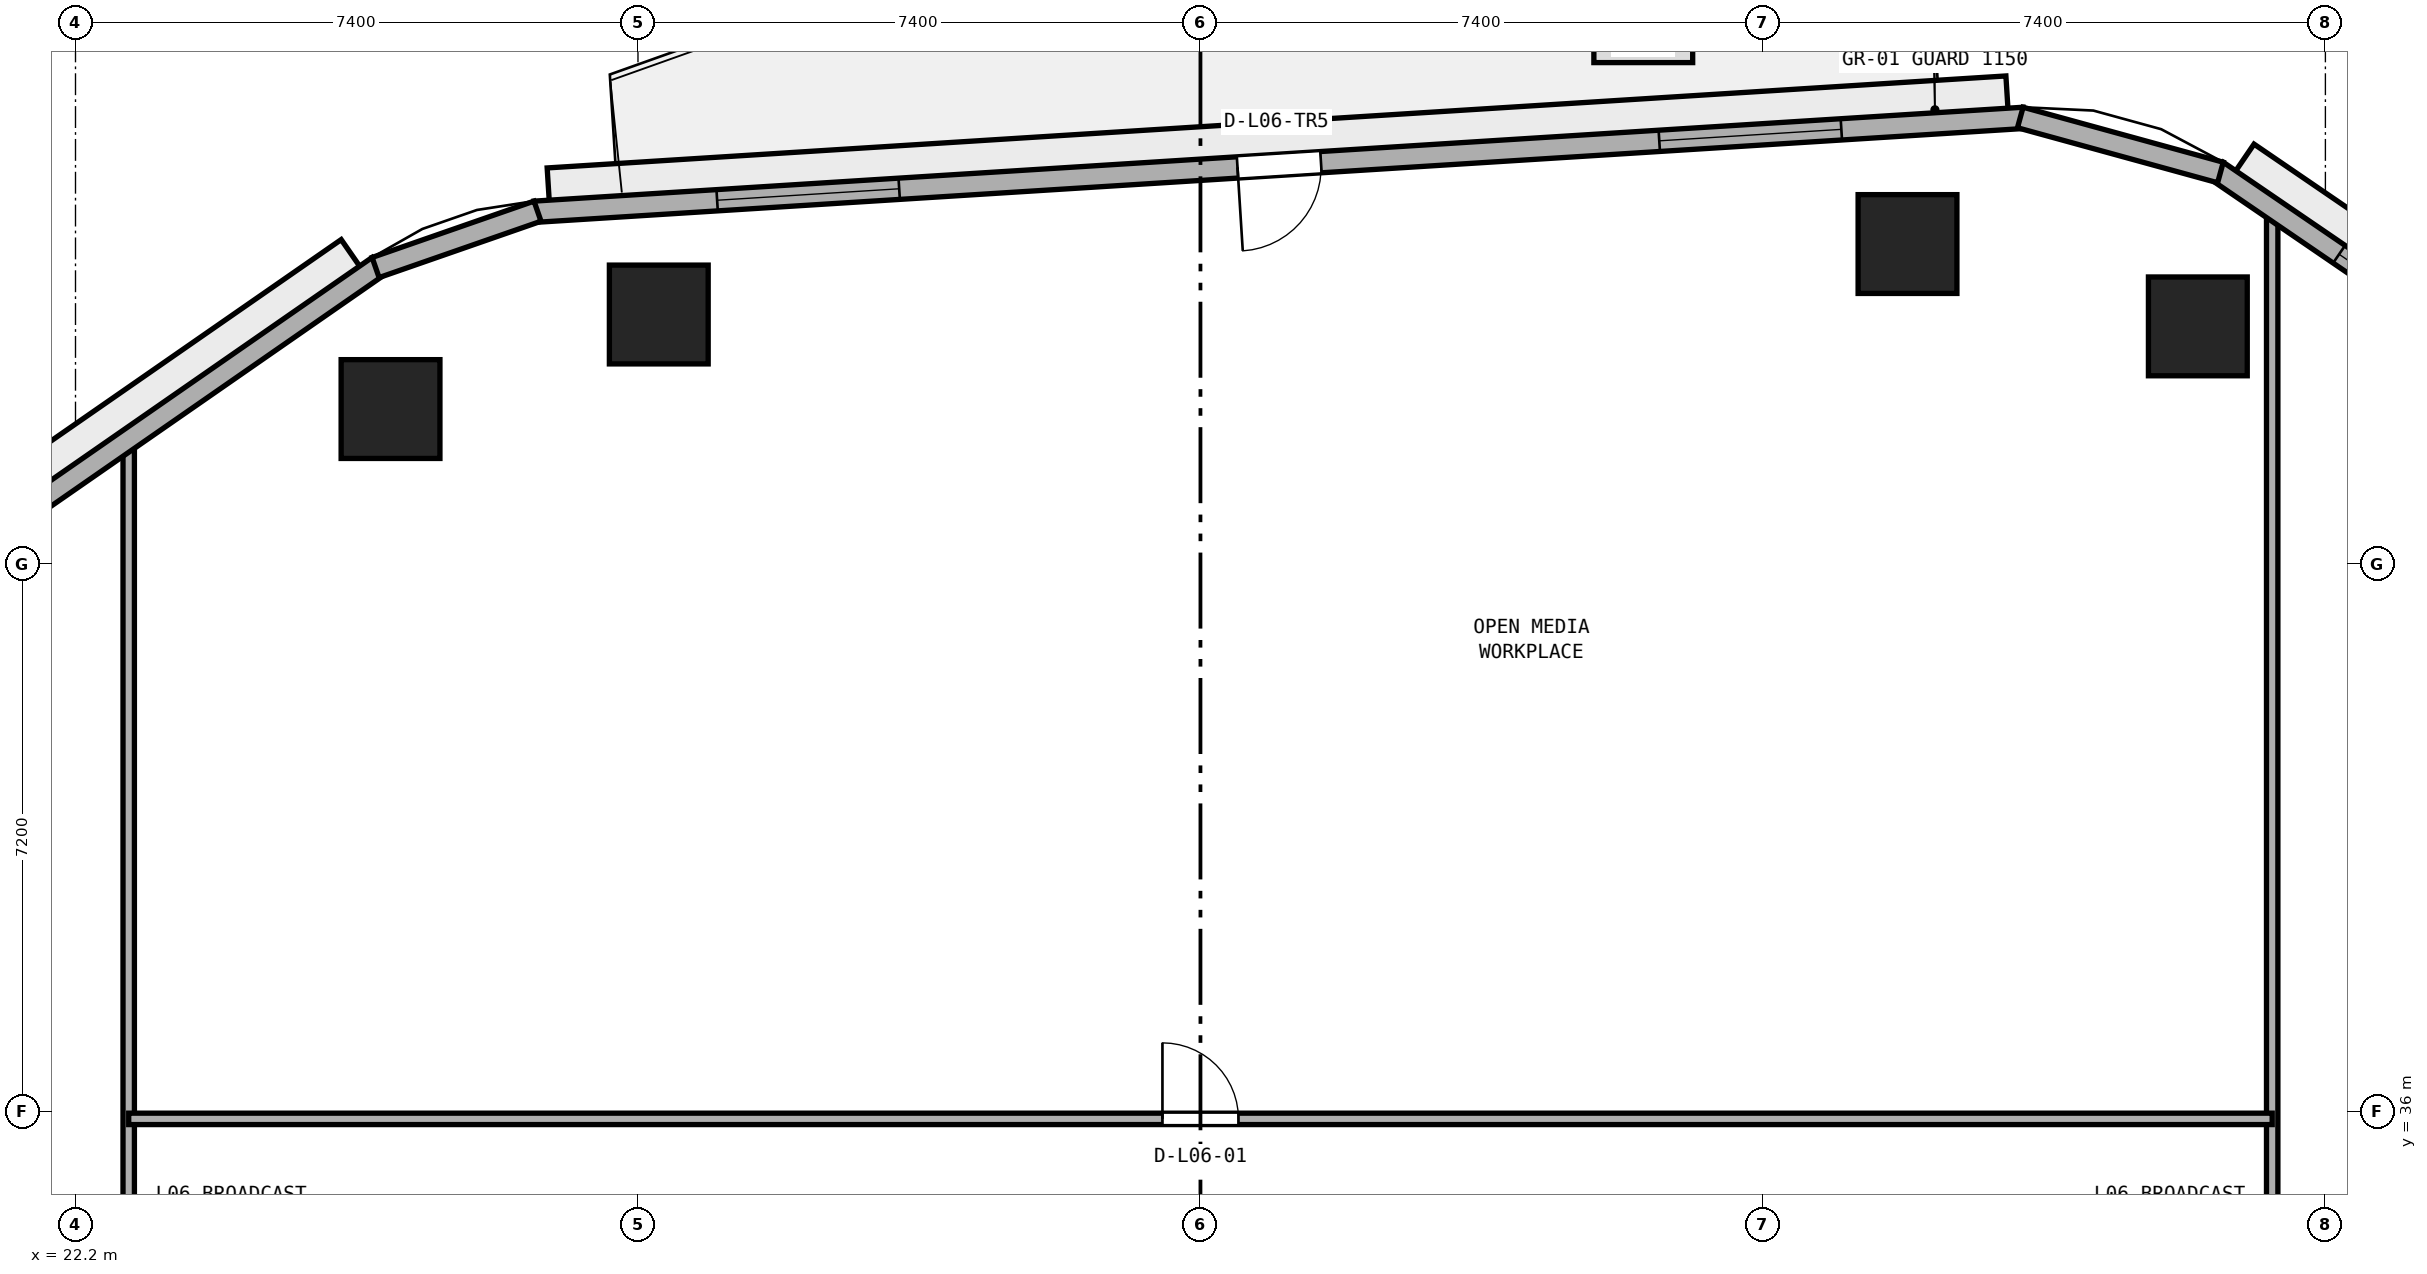
"""IFC4 building model, lengths in metres.
Left out: names, types, materials, properties, quantities, classifications, styles, units other than length and angle.
Written with IfcOpenShell. Run it as: python <this file> out.ifc"""

import sys

from ifc_helpers import new_model, si_unit, direction, frame, frame_2d, origin, origin_2d, place, context, subcontext, project, spatial, rectangle, extrude, element, fill, save


model = new_model("IFC4")
c1 = context("Model", 3, precision=1e-05, world=origin(), true_north=direction((0.0, 1.0)))
c2 = subcontext(c1, "Body", "Model", "MODEL_VIEW")
j1 = project(units=[si_unit("LENGTHUNIT", "METRE"), si_unit("PLANEANGLEUNIT", "RADIAN")], contexts=[c1])
p1 = place(None, origin())
s1 = spatial("IfcSite", under=j1, at=p1, CompositionType="ELEMENT")
p2 = place(p1, origin())
s2 = spatial("IfcBuilding", under=s1, at=p2, CompositionType="ELEMENT")
p3 = place(p2, frame((0.0, 0.0, 28.8)))
s3 = spatial("IfcBuildingStorey", under=s2, at=p3, CompositionType="ELEMENT", Elevation=28.8)
for number, where, z_axis, x_axis in (
    (1, (50.122, 46.326, 0.0), (0.0, 0.0, 1.0), (1.0, 0.0, 0.0)),
    (2, (46.302, 47.409, 0.0), (0.0, 0.0, 1.0), (1.0, 0.0, 0.0)),
    (3, (29.874, 46.482, 0.0), (0.0, 0.0, 1.0), (1.0, 0.0, 0.0)),
    (4, (26.344, 45.238, 0.0), (0.0, 0.0, 1.0), (1.0, 0.0, 0.0)),
):
    element("IfcColumn", number, at=place(p3, frame(where, z_axis=z_axis, x_axis=x_axis)), inside=s3, PredefinedType="COLUMN", context=c2, shape_type="SweptSolid", body=[
        extrude(rectangle(XDim=1.3, YDim=1.3, at=origin_2d()), origin(), (0.0, 0.0, 1.0), 3.8),
    ])
p4 = place(p3, frame((51.1, 2.651, 0.0), z_axis=(0.0, 0.0, 1.0), x_axis=(0.0, 1.0, 0.0)))
e5 = element("IfcWall", 5, at=p4, inside=s3, PredefinedType="PARTITIONING", context=c2, shape_type="SweptSolid", body=[
    extrude(rectangle(XDim=45.255, YDim=0.15, at=frame_2d((22.627, 0.0))), origin(), (0.0, 0.0, 1.0), 3.525),
])
p5 = place(p4, frame((15.699, 0.0, 0.0)))
e6 = element("IfcOpeningElement", 6, at=p5, cuts=e5, PredefinedType="OPENING", context=c2, shape_type="SweptSolid", body=[
    extrude(rectangle(XDim=0.9, YDim=2.1, at=frame_2d((0.45, 1.05))), frame((0.0, 0.085, 0.0), z_axis=(0.0, -1.0, 0.0), x_axis=(1.0, 0.0, 0.0)), (0.0, 0.0, 1.0), 0.17),
])
p6 = place(p4, frame((26.349, 0.0, 0.0)))
e7 = element("IfcOpeningElement", 7, at=p6, cuts=e5, PredefinedType="OPENING", context=c2, shape_type="SweptSolid", body=[
    extrude(rectangle(XDim=1.0, YDim=2.12, at=frame_2d((0.5, 1.06))), frame((0.0, 0.085, 0.0), z_axis=(0.0, -1.0, 0.0), x_axis=(1.0, 0.0, 0.0)), (0.0, 0.0, 1.0), 0.17),
])
p7 = place(p3, frame((22.9, 5.316, 0.0), z_axis=(0.0, 0.0, 1.0), x_axis=(0.0, 1.0, 0.0)))
e8 = element("IfcWall", 8, at=p7, inside=s3, PredefinedType="PARTITIONING", context=c2, shape_type="SweptSolid", body=[
    extrude(rectangle(XDim=39.555, YDim=0.15, at=frame_2d((19.777, 0.0))), origin(), (0.0, 0.0, 1.0), 3.525),
])
p8 = place(p7, frame((12.135, 0.0, 0.0)))
e9 = element("IfcOpeningElement", 9, at=p8, cuts=e8, PredefinedType="OPENING", context=c2, shape_type="SweptSolid", body=[
    extrude(rectangle(XDim=0.9, YDim=2.1, at=frame_2d((0.45, 1.05))), frame((0.0, 0.085, 0.0), z_axis=(0.0, -1.0, 0.0), x_axis=(1.0, 0.0, 0.0)), (0.0, 0.0, 1.0), 0.17),
])
p9 = place(p7, frame((22.834, 0.0, 0.0)))
e10 = element("IfcOpeningElement", 10, at=p9, cuts=e8, PredefinedType="OPENING", context=c2, shape_type="SweptSolid", body=[
    extrude(rectangle(XDim=0.9, YDim=2.1, at=frame_2d((0.45, 1.05))), frame((0.0, 0.085, 0.0), z_axis=(0.0, -1.0, 0.0), x_axis=(1.0, 0.0, 0.0)), (0.0, 0.0, 1.0), 0.17),
])
p10 = place(p3, frame((22.9, 35.9, 0.0), z_axis=(0.0, 0.0, 1.0), x_axis=(1.0, 0.0, 0.0)))
e11 = element("IfcWall", 11, at=p10, inside=s3, PredefinedType="PARTITIONING", context=c2, shape_type="SweptSolid", body=[
    extrude(rectangle(XDim=28.2, YDim=0.15, at=frame_2d((14.1, 0.0))), origin(), (0.0, 0.0, 1.0), 3.525),
])
p11 = place(p10, frame((13.6, 0.0, 0.0)))
e12 = element("IfcOpeningElement", 12, at=p11, cuts=e11, PredefinedType="OPENING", context=c2, shape_type="SweptSolid", body=[
    extrude(rectangle(XDim=1.0, YDim=2.12, at=frame_2d((0.5, 1.06))), frame((0.0, 0.085, 0.0), z_axis=(0.0, -1.0, 0.0), x_axis=(1.0, 0.0, 0.0)), (0.0, 0.0, 1.0), 0.17),
])
p12 = place(p3, frame((64.29, 38.867, 0.0), z_axis=(0.0, 0.0, 1.0), x_axis=(-0.825755550159, 0.564028165416, 0.0)))
e13 = element("IfcWall", 13, at=p12, inside=s3, PredefinedType="STANDARD", context=c2, shape_type="SweptSolid", body=[
    extrude(rectangle(XDim=16.848, YDim=0.28, at=frame_2d((8.424, 0.0))), origin(), (0.0, 0.0, 1.0), 3.525),
])
p13 = place(p12, frame((1.941, 0.0, 0.9)))
e14 = element("IfcOpeningElement", 14, at=p13, cuts=e13, PredefinedType="OPENING", context=c2, shape_type="SweptSolid", body=[
    extrude(rectangle(XDim=2.4, YDim=1.75, at=frame_2d((1.2, 0.875))), frame((0.0, 0.15, 0.0), z_axis=(0.0, -1.0, 0.0), x_axis=(1.0, 0.0, 0.0)), (0.0, 0.0, 1.0), 0.3),
])
p14 = place(p12, frame((7.224, 0.0, 0.9)))
e15 = element("IfcOpeningElement", 15, at=p14, cuts=e13, PredefinedType="OPENING", context=c2, shape_type="SweptSolid", body=[
    extrude(rectangle(XDim=2.4, YDim=1.75, at=frame_2d((1.2, 0.875))), frame((0.0, 0.15, 0.0), z_axis=(0.0, -1.0, 0.0), x_axis=(1.0, 0.0, 0.0)), (0.0, 0.0, 1.0), 0.3),
])
p15 = place(p12, frame((12.507, 0.0, 0.9)))
e16 = element("IfcOpeningElement", 16, at=p15, cuts=e13, PredefinedType="OPENING", context=c2, shape_type="SweptSolid", body=[
    extrude(rectangle(XDim=2.4, YDim=1.75, at=frame_2d((1.2, 0.875))), frame((0.0, 0.15, 0.0), z_axis=(0.0, -1.0, 0.0), x_axis=(1.0, 0.0, 0.0)), (0.0, 0.0, 1.0), 0.3),
])
p16 = place(p3, frame((47.832, 49.069, 0.0), z_axis=(0.0, 0.0, 1.0), x_axis=(-0.998017725054, -0.062933460723, 0.0)))
e17 = element("IfcWall", 17, at=p16, inside=s3, PredefinedType="STANDARD", context=c2, shape_type="SweptSolid", body=[
    extrude(rectangle(XDim=19.629, YDim=0.28, at=frame_2d((9.815, 0.0))), origin(), (0.0, 0.0, 1.0), 3.525),
])
p17 = place(p16, frame((9.265, 0.0, 0.0)))
e18 = element("IfcOpeningElement", 18, at=p17, cuts=e17, PredefinedType="OPENING", context=c2, shape_type="SweptSolid", body=[
    extrude(rectangle(XDim=1.1, YDim=2.2, at=frame_2d((0.55, 1.1))), frame((0.0, 0.15, 0.0), z_axis=(0.0, -1.0, 0.0), x_axis=(1.0, 0.0, 0.0)), (0.0, 0.0, 1.0), 0.3),
])
p18 = place(p16, frame((2.405, 0.0, 0.9)))
e19 = element("IfcOpeningElement", 19, at=p18, cuts=e17, PredefinedType="OPENING", context=c2, shape_type="SweptSolid", body=[
    extrude(rectangle(XDim=2.4, YDim=1.75, at=frame_2d((1.2, 0.875))), frame((0.0, 0.15, 0.0), z_axis=(0.0, -1.0, 0.0), x_axis=(1.0, 0.0, 0.0)), (0.0, 0.0, 1.0), 0.3),
])
p19 = place(p16, frame((14.825, 0.0, 0.9)))
e20 = element("IfcOpeningElement", 20, at=p19, cuts=e17, PredefinedType="OPENING", context=c2, shape_type="SweptSolid", body=[
    extrude(rectangle(XDim=2.4, YDim=1.75, at=frame_2d((1.2, 0.875))), frame((0.0, 0.15, 0.0), z_axis=(0.0, -1.0, 0.0), x_axis=(1.0, 0.0, 0.0)), (0.0, 0.0, 1.0), 0.3),
])
p20 = place(p3, frame((26.182, 47.118, 0.0), z_axis=(0.0, 0.0, 1.0), x_axis=(-0.821547956627, -0.570139417127, 0.0)))
e21 = element("IfcWall", 21, at=p20, inside=s3, PredefinedType="STANDARD", context=c2, shape_type="SweptSolid", body=[
    extrude(rectangle(XDim=18.132, YDim=0.28, at=frame_2d((9.066, 0.0))), origin(), (0.0, 0.0, 1.0), 3.525),
])
p21 = place(p20, frame((7.866, 0.0, 0.9)))
e22 = element("IfcOpeningElement", 22, at=p21, cuts=e21, PredefinedType="OPENING", context=c2, shape_type="SweptSolid", body=[
    extrude(rectangle(XDim=2.4, YDim=1.75, at=frame_2d((1.2, 0.875))), frame((0.0, 0.15, 0.0), z_axis=(0.0, -1.0, 0.0), x_axis=(1.0, 0.0, 0.0)), (0.0, 0.0, 1.0), 0.3),
])
p22 = place(p20, frame((13.577, 0.0, 0.9)))
e23 = element("IfcOpeningElement", 23, at=p22, cuts=e21, PredefinedType="OPENING", context=c2, shape_type="SweptSolid", body=[
    extrude(rectangle(XDim=2.4, YDim=1.75, at=frame_2d((1.2, 0.875))), frame((0.0, 0.15, 0.0), z_axis=(0.0, -1.0, 0.0), x_axis=(1.0, 0.0, 0.0)), (0.0, 0.0, 1.0), 0.3),
])
p23 = place(p3, frame((50.419, 48.351, 0.0), z_axis=(0.0, 0.0, 1.0), x_axis=(-0.964254516967, 0.264977784933, 0.0)))
e24 = element("IfcWall", 24, at=p23, inside=s3, PredefinedType="STANDARD", context=c2, shape_type="SweptSolid", body=[
    extrude(rectangle(XDim=2.731, YDim=0.28, at=frame_2d((1.365, 0.0))), origin(), (0.0, 0.0, 1.0), 3.525),
])
p24 = place(p3, frame((28.278, 47.842, 0.0), z_axis=(0.0, 0.0, 1.0), x_axis=(-0.9444559001, -0.328638179106, 0.0)))
e25 = element("IfcWall", 25, at=p24, inside=s3, PredefinedType="STANDARD", context=c2, shape_type="SweptSolid", body=[
    extrude(rectangle(XDim=2.255, YDim=0.28, at=frame_2d((1.128, 0.0))), origin(), (0.0, 0.0, 1.0), 3.525),
])
p25 = place(p11, origin())
e26 = element("IfcDoor", 26, at=p25, inside=s3, OperationType="SINGLE_SWING_LEFT", PredefinedType="DOOR", context=c2, shape_type="SweptSolid", body=[
    extrude(rectangle(XDim=1.0, YDim=2.12, at=frame_2d((0.5, 1.06))), frame((0.0, 0.025, 0.0), z_axis=(0.0, -1.0, 0.0), x_axis=(1.0, 0.0, 0.0)), (0.0, 0.0, 1.0), 0.05),
])
fill(e12, e26)
p26 = place(p15, origin())
e27 = element("IfcWindow", 27, at=p26, inside=s3, PartitioningType="SINGLE_PANEL", PredefinedType="WINDOW", context=c2, shape_type="SweptSolid", body=[
    extrude(rectangle(XDim=2.4, YDim=1.75, at=frame_2d((1.2, 0.875))), frame((0.0, 0.03, 0.0), z_axis=(0.0, -1.0, 0.0), x_axis=(1.0, 0.0, 0.0)), (0.0, 0.0, 1.0), 0.06),
])
fill(e16, e27)
p27 = place(p17, origin())
e28 = element("IfcDoor", 28, at=p27, inside=s3, OperationType="SINGLE_SWING_RIGHT", PredefinedType="DOOR", context=c2, shape_type="SweptSolid", body=[
    extrude(rectangle(XDim=1.1, YDim=2.2, at=frame_2d((0.55, 1.1))), frame((0.0, 0.025, 0.0), z_axis=(0.0, -1.0, 0.0), x_axis=(1.0, 0.0, 0.0)), (0.0, 0.0, 1.0), 0.05),
])
fill(e18, e28)
p28 = place(p18, origin())
e29 = element("IfcWindow", 29, at=p28, inside=s3, PartitioningType="SINGLE_PANEL", PredefinedType="WINDOW", context=c2, shape_type="SweptSolid", body=[
    extrude(rectangle(XDim=2.4, YDim=1.75, at=frame_2d((1.2, 0.875))), frame((0.0, 0.03, 0.0), z_axis=(0.0, -1.0, 0.0), x_axis=(1.0, 0.0, 0.0)), (0.0, 0.0, 1.0), 0.06),
])
fill(e19, e29)
p29 = place(p19, origin())
e30 = element("IfcWindow", 30, at=p29, inside=s3, PartitioningType="SINGLE_PANEL", PredefinedType="WINDOW", context=c2, shape_type="SweptSolid", body=[
    extrude(rectangle(XDim=2.4, YDim=1.75, at=frame_2d((1.2, 0.875))), frame((0.0, 0.03, 0.0), z_axis=(0.0, -1.0, 0.0), x_axis=(1.0, 0.0, 0.0)), (0.0, 0.0, 1.0), 0.06),
])
fill(e20, e30)
save(model, sys.argv[1])
